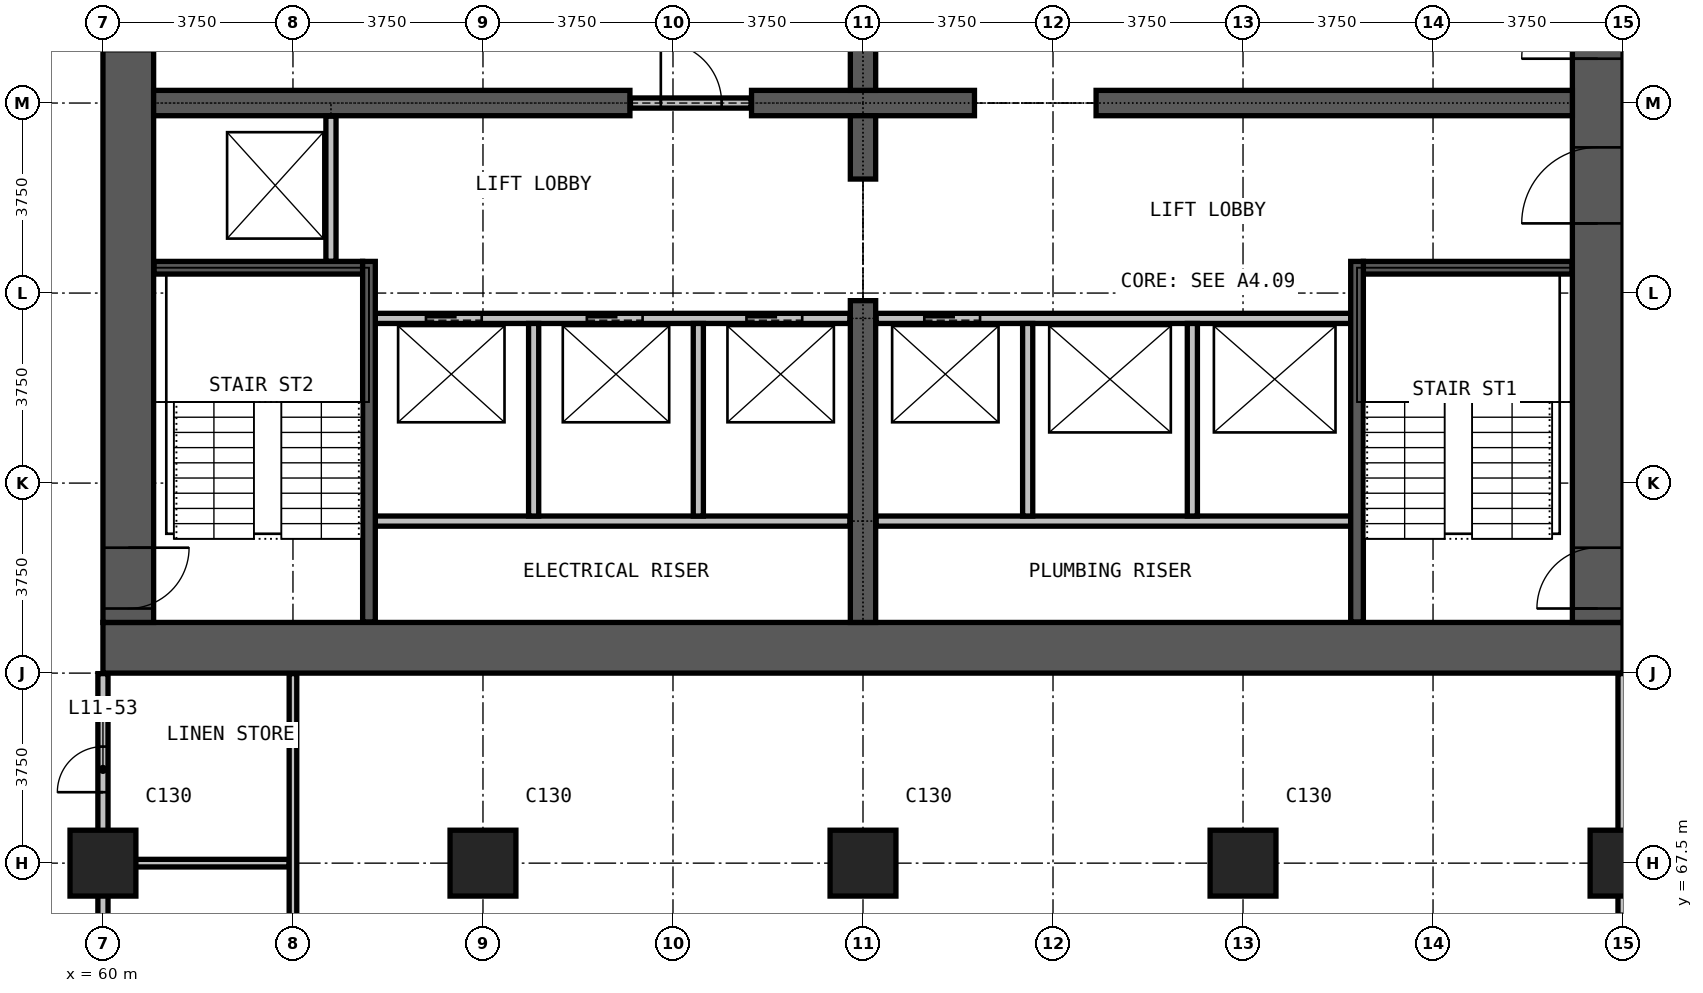
"""IFC4 building model, lengths in metres.
Left out: names, types, materials, properties, quantities, classifications, styles, units other than length and angle.
Written with IfcOpenShell. Run it as: python <this file> out.ifc"""

import sys

from ifc_helpers import new_model, si_unit, direction, frame, frame_2d, origin, origin_2d, place, context, subcontext, project, spatial, rectangle, extrude, element, fill, save


model = new_model("IFC4")
c1 = context("Model", 3, precision=1e-05, world=origin(), true_north=direction((0.0, 1.0)))
c2 = subcontext(c1, "Body", "Model", "MODEL_VIEW")
j1 = project(units=[si_unit("LENGTHUNIT", "METRE"), si_unit("PLANEANGLEUNIT", "RADIAN")], contexts=[c1])
p1 = place(None, origin())
s1 = spatial("IfcSite", under=j1, at=p1, CompositionType="ELEMENT")
p2 = place(p1, origin())
s2 = spatial("IfcBuilding", under=s1, at=p2, CompositionType="ELEMENT")
p3 = place(p2, frame((0.0, 0.0, 56.0)))
s3 = spatial("IfcBuildingStorey", under=s2, at=p3, CompositionType="ELEMENT", Elevation=56.0)
for number, where, z_axis, x_axis in (
    (1, (60.0, 67.5, 0.0), (0.0, 0.0, 1.0), (1.0, 0.0, 0.0)),
    (2, (67.5, 67.5, 0.0), (0.0, 0.0, 1.0), (1.0, 0.0, 0.0)),
    (3, (75.0, 67.5, 0.0), (0.0, 0.0, 1.0), (1.0, 0.0, 0.0)),
    (4, (82.5, 67.5, 0.0), (0.0, 0.0, 1.0), (1.0, 0.0, 0.0)),
    (5, (90.0, 67.5, 0.0), (0.0, 0.0, 1.0), (1.0, 0.0, 0.0)),
):
    element("IfcColumn", number, at=place(p3, frame(where, z_axis=z_axis, x_axis=x_axis)), inside=s3, PredefinedType="COLUMN", context=c2, shape_type="SweptSolid", body=[
        extrude(rectangle(XDim=1.3, YDim=1.3, at=origin_2d()), origin(), (0.0, 0.0, 1.0), 3.3),
    ])
p4 = place(p3, frame((60.0, 71.75, 0.0), z_axis=(0.0, 0.0, 1.0), x_axis=(1.0, 0.0, 0.0)))
e6 = element("IfcWall", 6, at=p4, inside=s3, PredefinedType="SHEAR", context=c2, shape_type="SweptSolid", body=[
    extrude(rectangle(XDim=30.0, YDim=1.0, at=frame_2d((15.0, 0.0))), origin(), (0.0, 0.0, 1.0), 3.3),
])
p5 = place(p3, frame((89.5, 72.25, 0.0), z_axis=(0.0, 0.0, 1.0), x_axis=(0.0, 1.0, 0.0)))
e7 = element("IfcWall", 7, at=p5, inside=s3, PredefinedType="SHEAR", context=c2, shape_type="SweptSolid", body=[
    extrude(rectangle(XDim=20.5, YDim=1.0, at=frame_2d((10.25, 0.0))), origin(), (0.0, 0.0, 1.0), 3.3),
])
p6 = place(p5, frame((0.275, 0.0, 0.0)))
e8 = element("IfcOpeningElement", 8, at=p6, cuts=e7, PredefinedType="OPENING", context=c2, shape_type="SweptSolid", body=[
    extrude(rectangle(XDim=1.2, YDim=2.2, at=frame_2d((0.6, 1.1))), frame((0.0, 0.51, 0.0), z_axis=(0.0, -1.0, 0.0), x_axis=(1.0, 0.0, 0.0)), (0.0, 0.0, 1.0), 1.02),
])
p7 = place(p5, frame((13.775, 0.0, 0.0)))
e9 = element("IfcOpeningElement", 9, at=p7, cuts=e7, PredefinedType="OPENING", context=c2, shape_type="SweptSolid", body=[
    extrude(rectangle(XDim=1.2, YDim=2.2, at=frame_2d((0.6, 1.1))), frame((0.0, 0.51, 0.0), z_axis=(0.0, -1.0, 0.0), x_axis=(1.0, 0.0, 0.0)), (0.0, 0.0, 1.0), 1.02),
])
p8 = place(p5, frame((7.875, 0.0, 0.0)))
e10 = element("IfcOpeningElement", 10, at=p8, cuts=e7, PredefinedType="OPENING", context=c2, shape_type="SweptSolid", body=[
    extrude(rectangle(XDim=1.5, YDim=2.2, at=frame_2d((0.75, 1.1))), frame((0.0, 0.51, 0.0), z_axis=(0.0, -1.0, 0.0), x_axis=(1.0, 0.0, 0.0)), (0.0, 0.0, 1.0), 1.02),
])
p9 = place(p5, frame((11.125, 0.0, 0.0)))
e11 = element("IfcOpeningElement", 11, at=p9, cuts=e7, PredefinedType="OPENING", context=c2, shape_type="SweptSolid", body=[
    extrude(rectangle(XDim=1.5, YDim=2.2, at=frame_2d((0.75, 1.1))), frame((0.0, 0.51, 0.0), z_axis=(0.0, -1.0, 0.0), x_axis=(1.0, 0.0, 0.0)), (0.0, 0.0, 1.0), 1.02),
])
p10 = place(p3, frame((60.5, 92.75, 0.0), z_axis=(0.0, 0.0, 1.0), x_axis=(0.0, -1.0, 0.0)))
e12 = element("IfcWall", 12, at=p10, inside=s3, PredefinedType="SHEAR", context=c2, shape_type="SweptSolid", body=[
    extrude(rectangle(XDim=20.5, YDim=1.0, at=frame_2d((10.25, 0.0))), origin(), (0.0, 0.0, 1.0), 3.3),
])
p11 = place(p10, frame((19.025, 0.0, 0.0)))
e13 = element("IfcOpeningElement", 13, at=p11, cuts=e12, PredefinedType="OPENING", context=c2, shape_type="SweptSolid", body=[
    extrude(rectangle(XDim=1.2, YDim=2.2, at=frame_2d((0.6, 1.1))), frame((0.0, 0.51, 0.0), z_axis=(0.0, -1.0, 0.0), x_axis=(1.0, 0.0, 0.0)), (0.0, 0.0, 1.0), 1.02),
])
p12 = place(p10, frame((8.025, 0.0, 0.0)))
e14 = element("IfcOpeningElement", 14, at=p12, cuts=e12, PredefinedType="OPENING", context=c2, shape_type="SweptSolid", body=[
    extrude(rectangle(XDim=1.2, YDim=2.2, at=frame_2d((0.6, 1.1))), frame((0.0, 0.51, 0.0), z_axis=(0.0, -1.0, 0.0), x_axis=(1.0, 0.0, 0.0)), (0.0, 0.0, 1.0), 1.02),
])
p13 = place(p3, frame((61.0, 82.5, 0.0), z_axis=(0.0, 0.0, 1.0), x_axis=(1.0, 0.0, 0.0)))
e15 = element("IfcWall", 15, at=p13, inside=s3, PredefinedType="SHEAR", context=c2, shape_type="SweptSolid", body=[
    extrude(rectangle(XDim=9.4, YDim=0.5, at=frame_2d((4.7, 0.0))), origin(), (0.0, 0.0, 1.0), 3.3),
])
p14 = place(p3, frame((72.8, 82.5, 0.0), z_axis=(0.0, 0.0, 1.0), x_axis=(1.0, 0.0, 0.0)))
e16 = element("IfcWall", 16, at=p14, inside=s3, PredefinedType="SHEAR", context=c2, shape_type="SweptSolid", body=[
    extrude(rectangle(XDim=4.4, YDim=0.5, at=frame_2d((2.2, 0.0))), origin(), (0.0, 0.0, 1.0), 3.3),
])
p15 = place(p3, frame((79.6, 82.5, 0.0), z_axis=(0.0, 0.0, 1.0), x_axis=(1.0, 0.0, 0.0)))
e17 = element("IfcWall", 17, at=p15, inside=s3, PredefinedType="SHEAR", context=c2, shape_type="SweptSolid", body=[
    extrude(rectangle(XDim=9.4, YDim=0.5, at=frame_2d((4.7, 0.0))), origin(), (0.0, 0.0, 1.0), 3.3),
])
p16 = place(p3, frame((75.0, 72.25, 0.0), z_axis=(0.0, 0.0, 1.0), x_axis=(0.0, 1.0, 0.0)))
e18 = element("IfcWall", 18, at=p16, inside=s3, PredefinedType="SHEAR", context=c2, shape_type="SweptSolid", body=[
    extrude(rectangle(XDim=6.35, YDim=0.5, at=frame_2d((3.175, 0.0))), origin(), (0.0, 0.0, 1.0), 3.3),
])
for number, where, z_axis, x_axis in (
    (19, (75.0, 81.0, 0.0), (0.0, 0.0, 1.0), (0.0, 1.0, 0.0)),
    (20, (75.0, 82.75, 0.0), (0.0, 0.0, 1.0), (0.0, 1.0, 0.0)),
):
    element("IfcWall", number, at=place(p3, frame(where, z_axis=z_axis, x_axis=x_axis)), inside=s3, PredefinedType="SHEAR", context=c2, shape_type="SweptSolid", body=[
        extrude(rectangle(XDim=1.25, YDim=0.5, at=frame_2d((0.625, 0.0))), origin(), (0.0, 0.0, 1.0), 3.3),
    ])
p17 = place(p3, frame((70.41, 82.5, 0.0), z_axis=(0.0, 0.0, 1.0), x_axis=(1.0, 0.0, 0.0)))
e21 = element("IfcWall", 21, at=p17, inside=s3, PredefinedType="PARTITIONING", context=c2, shape_type="SweptSolid", body=[
    extrude(rectangle(XDim=2.38, YDim=0.2, at=frame_2d((1.19, 0.0))), origin(), (0.0, 0.0, 1.0), 2.4),
])
p18 = place(p17, frame((0.6, 0.0, 0.0)))
e22 = element("IfcOpeningElement", 22, at=p18, cuts=e21, PredefinedType="OPENING", context=c2, shape_type="SweptSolid", body=[
    extrude(rectangle(XDim=1.2, YDim=2.2, at=frame_2d((0.6, 1.1))), frame((0.0, 0.11, 0.0), z_axis=(0.0, -1.0, 0.0), x_axis=(1.0, 0.0, 0.0)), (0.0, 0.0, 1.0), 0.22),
])
p19 = place(p3, frame((60.0, 52.4, 0.0), z_axis=(0.0, 0.0, 1.0), x_axis=(0.0, 1.0, 0.0)))
e23 = element("IfcWall", 23, at=p19, inside=s3, PredefinedType="PARTITIONING", context=c2, shape_type="SweptSolid", body=[
    extrude(rectangle(XDim=18.84, YDim=0.2, at=frame_2d((9.42, 0.0))), origin(), (0.0, 0.0, 1.0), 3.0),
])
p20 = place(p19, frame((3.35, 0.0, 0.0)))
e24 = element("IfcOpeningElement", 24, at=p20, cuts=e23, PredefinedType="OPENING", context=c2, shape_type="SweptSolid", body=[
    extrude(rectangle(XDim=1.0, YDim=2.2, at=frame_2d((0.5, 1.1))), frame((0.0, 0.11, 0.0), z_axis=(0.0, -1.0, 0.0), x_axis=(1.0, 0.0, 0.0)), (0.0, 0.0, 1.0), 0.22),
])
p21 = place(p19, frame((10.9, 0.0, 0.0)))
e25 = element("IfcOpeningElement", 25, at=p21, cuts=e23, PredefinedType="OPENING", context=c2, shape_type="SweptSolid", body=[
    extrude(rectangle(XDim=0.9, YDim=2.2, at=frame_2d((0.45, 1.1))), frame((0.0, 0.11, 0.0), z_axis=(0.0, -1.0, 0.0), x_axis=(1.0, 0.0, 0.0)), (0.0, 0.0, 1.0), 0.22),
])
p22 = place(p19, frame((16.5, 0.0, 0.0)))
e26 = element("IfcOpeningElement", 26, at=p22, cuts=e23, PredefinedType="OPENING", context=c2, shape_type="SweptSolid", body=[
    extrude(rectangle(XDim=0.9, YDim=2.2, at=frame_2d((0.45, 1.1))), frame((0.0, 0.11, 0.0), z_axis=(0.0, -1.0, 0.0), x_axis=(1.0, 0.0, 0.0)), (0.0, 0.0, 1.0), 0.22),
])
p23 = place(p3, frame((90.0, 52.4, 0.0), z_axis=(0.0, 0.0, 1.0), x_axis=(0.0, 1.0, 0.0)))
e27 = element("IfcWall", 27, at=p23, inside=s3, PredefinedType="PARTITIONING", context=c2, shape_type="SweptSolid", body=[
    extrude(rectangle(XDim=18.84, YDim=0.2, at=frame_2d((9.42, 0.0))), origin(), (0.0, 0.0, 1.0), 3.0),
])
p24 = place(p23, frame((3.35, 0.0, 0.0)))
e28 = element("IfcOpeningElement", 28, at=p24, cuts=e27, PredefinedType="OPENING", context=c2, shape_type="SweptSolid", body=[
    extrude(rectangle(XDim=1.0, YDim=2.2, at=frame_2d((0.5, 1.1))), frame((0.0, 0.11, 0.0), z_axis=(0.0, -1.0, 0.0), x_axis=(1.0, 0.0, 0.0)), (0.0, 0.0, 1.0), 0.22),
])
p25 = place(p23, frame((12.3, 0.0, 0.0)))
e29 = element("IfcOpeningElement", 29, at=p25, cuts=e27, PredefinedType="OPENING", context=c2, shape_type="SweptSolid", body=[
    extrude(rectangle(XDim=1.8, YDim=2.2, at=frame_2d((0.9, 1.1))), frame((0.0, 0.11, 0.0), z_axis=(0.0, -1.0, 0.0), x_axis=(1.0, 0.0, 0.0)), (0.0, 0.0, 1.0), 0.22),
])
p26 = place(p3, frame((60.1, 67.5, 0.0), z_axis=(0.0, 0.0, 1.0), x_axis=(1.0, 0.0, 0.0)))
e30 = element("IfcWall", 30, at=p26, inside=s3, PredefinedType="PARTITIONING", context=c2, shape_type="SweptSolid", body=[
    extrude(rectangle(XDim=3.575, YDim=0.15, at=frame_2d((1.788, 0.0))), origin(), (0.0, 0.0, 1.0), 3.0),
])
p27 = place(p3, frame((63.75, 60.075, 0.0), z_axis=(0.0, 0.0, 1.0), x_axis=(0.0, 1.0, 0.0)))
e31 = element("IfcWall", 31, at=p27, inside=s3, PredefinedType="PARTITIONING", context=c2, shape_type="SweptSolid", body=[
    extrude(rectangle(XDim=11.165, YDim=0.15, at=frame_2d((5.583, 0.0))), origin(), (0.0, 0.0, 1.0), 3.0),
])
for number, where, z_axis, x_axis in (
    (32, (65.375, 74.25, 0.0), (0.0, 0.0, 1.0), (1.0, 0.0, 0.0)),
    (33, (75.26, 74.25, 0.0), (0.0, 0.0, 1.0), (1.0, 0.0, 0.0)),
):
    element("IfcWall", number, at=place(p3, frame(where, z_axis=z_axis, x_axis=x_axis)), inside=s3, PredefinedType="PARTITIONING", context=c2, shape_type="SweptSolid", body=[
        extrude(rectangle(XDim=9.365, YDim=0.2, at=frame_2d((4.683, 0.0))), origin(), (0.0, 0.0, 1.0), 3.0),
    ])
p28 = place(p3, frame((65.375, 78.25, 0.0), z_axis=(0.0, 0.0, 1.0), x_axis=(1.0, 0.0, 0.0)))
e34 = element("IfcWall", 34, at=p28, inside=s3, PredefinedType="PARTITIONING", context=c2, shape_type="SweptSolid", body=[
    extrude(rectangle(XDim=9.365, YDim=0.2, at=frame_2d((4.683, 0.0))), origin(), (0.0, 0.0, 1.0), 3.0),
])
p29 = place(p28, frame((1.0, 0.0, 0.0)))
e35 = element("IfcOpeningElement", 35, at=p29, cuts=e34, PredefinedType="OPENING", context=c2, shape_type="SweptSolid", body=[
    extrude(rectangle(XDim=1.1, YDim=2.2, at=frame_2d((0.55, 1.1))), frame((0.0, 0.11, 0.0), z_axis=(0.0, -1.0, 0.0), x_axis=(1.0, 0.0, 0.0)), (0.0, 0.0, 1.0), 0.22),
])
p30 = place(p28, frame((4.175, 0.0, 0.0)))
e36 = element("IfcOpeningElement", 36, at=p30, cuts=e34, PredefinedType="OPENING", context=c2, shape_type="SweptSolid", body=[
    extrude(rectangle(XDim=1.1, YDim=2.2, at=frame_2d((0.55, 1.1))), frame((0.0, 0.11, 0.0), z_axis=(0.0, -1.0, 0.0), x_axis=(1.0, 0.0, 0.0)), (0.0, 0.0, 1.0), 0.22),
])
p31 = place(p28, frame((7.325, 0.0, 0.0)))
e37 = element("IfcOpeningElement", 37, at=p31, cuts=e34, PredefinedType="OPENING", context=c2, shape_type="SweptSolid", body=[
    extrude(rectangle(XDim=1.1, YDim=2.2, at=frame_2d((0.55, 1.1))), frame((0.0, 0.11, 0.0), z_axis=(0.0, -1.0, 0.0), x_axis=(1.0, 0.0, 0.0)), (0.0, 0.0, 1.0), 0.22),
])
p32 = place(p3, frame((75.26, 78.25, 0.0), z_axis=(0.0, 0.0, 1.0), x_axis=(1.0, 0.0, 0.0)))
e38 = element("IfcWall", 38, at=p32, inside=s3, PredefinedType="PARTITIONING", context=c2, shape_type="SweptSolid", body=[
    extrude(rectangle(XDim=9.365, YDim=0.2, at=frame_2d((4.683, 0.0))), origin(), (0.0, 0.0, 1.0), 3.0),
])
p33 = place(p32, frame((0.95, 0.0, 0.0)))
e39 = element("IfcOpeningElement", 39, at=p33, cuts=e38, PredefinedType="OPENING", context=c2, shape_type="SweptSolid", body=[
    extrude(rectangle(XDim=1.1, YDim=2.2, at=frame_2d((0.55, 1.1))), frame((0.0, 0.11, 0.0), z_axis=(0.0, -1.0, 0.0), x_axis=(1.0, 0.0, 0.0)), (0.0, 0.0, 1.0), 0.22),
])
p34 = place(p3, frame((64.5, 79.375, 0.0), z_axis=(0.0, 0.0, 1.0), x_axis=(0.0, 1.0, 0.0)))
e40 = element("IfcWall", 40, at=p34, inside=s3, PredefinedType="PARTITIONING", context=c2, shape_type="SweptSolid", body=[
    extrude(rectangle(XDim=2.865, YDim=0.2, at=frame_2d((1.433, 0.0))), origin(), (0.0, 0.0, 1.0), 3.0),
])
for number, where, z_axis, x_axis in (
    (41, (68.5, 74.35, 0.0), (0.0, 0.0, 1.0), (0.0, 1.0, 0.0)),
    (42, (71.75, 74.35, 0.0), (0.0, 0.0, 1.0), (0.0, 1.0, 0.0)),
    (43, (78.25, 74.35, 0.0), (0.0, 0.0, 1.0), (0.0, 1.0, 0.0)),
    (44, (81.5, 74.35, 0.0), (0.0, 0.0, 1.0), (0.0, 1.0, 0.0)),
):
    element("IfcWall", number, at=place(p3, frame(where, z_axis=z_axis, x_axis=x_axis)), inside=s3, PredefinedType="PARTITIONING", context=c2, shape_type="SweptSolid", body=[
        extrude(rectangle(XDim=3.8, YDim=0.2, at=frame_2d((1.9, 0.0))), origin(), (0.0, 0.0, 1.0), 3.0),
    ])
for number, where, z_axis, x_axis in (
    (45, (61.01, 79.25, 0.0), (0.0, 0.0, 1.0), (1.0, 0.0, 0.0)),
    (46, (84.875, 79.25, 0.0), (0.0, 0.0, 1.0), (1.0, 0.0, 0.0)),
):
    element("IfcWall", number, at=place(p3, frame(where, z_axis=z_axis, x_axis=x_axis)), inside=s3, PredefinedType="PARTITIONING", context=c2, shape_type="SweptSolid", body=[
        extrude(rectangle(XDim=4.115, YDim=0.25, at=frame_2d((2.058, 0.0))), origin(), (0.0, 0.0, 1.0), 3.0),
    ])
for number, where, z_axis, x_axis in (
    (47, (65.25, 72.26, 0.0), (0.0, 0.0, 1.0), (0.0, 1.0, 0.0)),
    (48, (84.75, 72.26, 0.0), (0.0, 0.0, 1.0), (0.0, 1.0, 0.0)),
):
    element("IfcWall", number, at=place(p3, frame(where, z_axis=z_axis, x_axis=x_axis)), inside=s3, PredefinedType="PARTITIONING", context=c2, shape_type="SweptSolid", body=[
        extrude(rectangle(XDim=7.115, YDim=0.25, at=frame_2d((3.558, 0.0))), origin(), (0.0, 0.0, 1.0), 3.0),
    ])
p35 = place(p29, origin())
e49 = element("IfcDoor", 49, at=p35, inside=s3, OperationType="DOUBLE_DOOR_SLIDING", PredefinedType="DOOR", context=c2, shape_type="SweptSolid", body=[
    extrude(rectangle(XDim=1.1, YDim=2.2, at=frame_2d((0.55, 1.1))), frame((0.0, 0.025, 0.0), z_axis=(0.0, -1.0, 0.0), x_axis=(1.0, 0.0, 0.0)), (0.0, 0.0, 1.0), 0.05),
])
fill(e35, e49)
p36 = place(p30, origin())
e50 = element("IfcDoor", 50, at=p36, inside=s3, OperationType="DOUBLE_DOOR_SLIDING", PredefinedType="DOOR", context=c2, shape_type="SweptSolid", body=[
    extrude(rectangle(XDim=1.1, YDim=2.2, at=frame_2d((0.55, 1.1))), frame((0.0, 0.025, 0.0), z_axis=(0.0, -1.0, 0.0), x_axis=(1.0, 0.0, 0.0)), (0.0, 0.0, 1.0), 0.05),
])
fill(e36, e50)
p37 = place(p31, origin())
e51 = element("IfcDoor", 51, at=p37, inside=s3, OperationType="DOUBLE_DOOR_SLIDING", PredefinedType="DOOR", context=c2, shape_type="SweptSolid", body=[
    extrude(rectangle(XDim=1.1, YDim=2.2, at=frame_2d((0.55, 1.1))), frame((0.0, 0.025, 0.0), z_axis=(0.0, -1.0, 0.0), x_axis=(1.0, 0.0, 0.0)), (0.0, 0.0, 1.0), 0.05),
])
fill(e37, e51)
p38 = place(p33, origin())
e52 = element("IfcDoor", 52, at=p38, inside=s3, OperationType="DOUBLE_DOOR_SLIDING", PredefinedType="DOOR", context=c2, shape_type="SweptSolid", body=[
    extrude(rectangle(XDim=1.1, YDim=2.2, at=frame_2d((0.55, 1.1))), frame((0.0, 0.025, 0.0), z_axis=(0.0, -1.0, 0.0), x_axis=(1.0, 0.0, 0.0)), (0.0, 0.0, 1.0), 0.05),
])
fill(e39, e52)
p39 = place(p18, origin())
e53 = element("IfcDoor", 53, at=p39, inside=s3, OperationType="SINGLE_SWING_RIGHT", PredefinedType="DOOR", context=c2, shape_type="SweptSolid", body=[
    extrude(rectangle(XDim=1.2, YDim=2.2, at=frame_2d((0.6, 1.1))), frame((0.0, 0.025, 0.0), z_axis=(0.0, -1.0, 0.0), x_axis=(1.0, 0.0, 0.0)), (0.0, 0.0, 1.0), 0.05),
])
fill(e22, e53)
p40 = place(p6, origin())
e54 = element("IfcDoor", 54, at=p40, inside=s3, OperationType="SINGLE_SWING_LEFT", PredefinedType="DOOR", context=c2, shape_type="SweptSolid", body=[
    extrude(rectangle(XDim=1.2, YDim=2.2, at=frame_2d((0.6, 1.1))), frame((0.0, 0.025, 0.0), z_axis=(0.0, -1.0, 0.0), x_axis=(1.0, 0.0, 0.0)), (0.0, 0.0, 1.0), 0.05),
])
fill(e8, e54)
p41 = place(p11, origin())
e55 = element("IfcDoor", 55, at=p41, inside=s3, OperationType="SINGLE_SWING_LEFT", PredefinedType="DOOR", context=c2, shape_type="SweptSolid", body=[
    extrude(rectangle(XDim=1.2, YDim=2.2, at=frame_2d((0.6, 1.1))), frame((0.0, 0.025, 0.0), z_axis=(0.0, -1.0, 0.0), x_axis=(1.0, 0.0, 0.0)), (0.0, 0.0, 1.0), 0.05),
])
fill(e13, e55)
p42 = place(p8, origin())
e56 = element("IfcDoor", 56, at=p42, inside=s3, OperationType="DOUBLE_DOOR_SINGLE_SWING", PredefinedType="DOOR", context=c2, shape_type="SweptSolid", body=[
    extrude(rectangle(XDim=1.5, YDim=2.2, at=frame_2d((0.75, 1.1))), frame((0.0, 0.025, 0.0), z_axis=(0.0, -1.0, 0.0), x_axis=(1.0, 0.0, 0.0)), (0.0, 0.0, 1.0), 0.05),
])
fill(e10, e56)
p43 = place(p9, origin())
e57 = element("IfcDoor", 57, at=p43, inside=s3, OperationType="DOUBLE_DOOR_SINGLE_SWING", PredefinedType="DOOR", context=c2, shape_type="SweptSolid", body=[
    extrude(rectangle(XDim=1.5, YDim=2.2, at=frame_2d((0.75, 1.1))), frame((0.0, 0.025, 0.0), z_axis=(0.0, -1.0, 0.0), x_axis=(1.0, 0.0, 0.0)), (0.0, 0.0, 1.0), 0.05),
])
fill(e11, e57)
p44 = place(p22, origin())
e58 = element("IfcDoor", 58, at=p44, inside=s3, OperationType="SINGLE_SWING_RIGHT", PredefinedType="DOOR", context=c2, shape_type="SweptSolid", body=[
    extrude(rectangle(XDim=0.9, YDim=2.2, at=frame_2d((0.45, 1.1))), frame((0.0, 0.025, 0.0), z_axis=(0.0, -1.0, 0.0), x_axis=(1.0, 0.0, 0.0)), (0.0, 0.0, 1.0), 0.05),
])
fill(e26, e58)
save(model, sys.argv[1])
